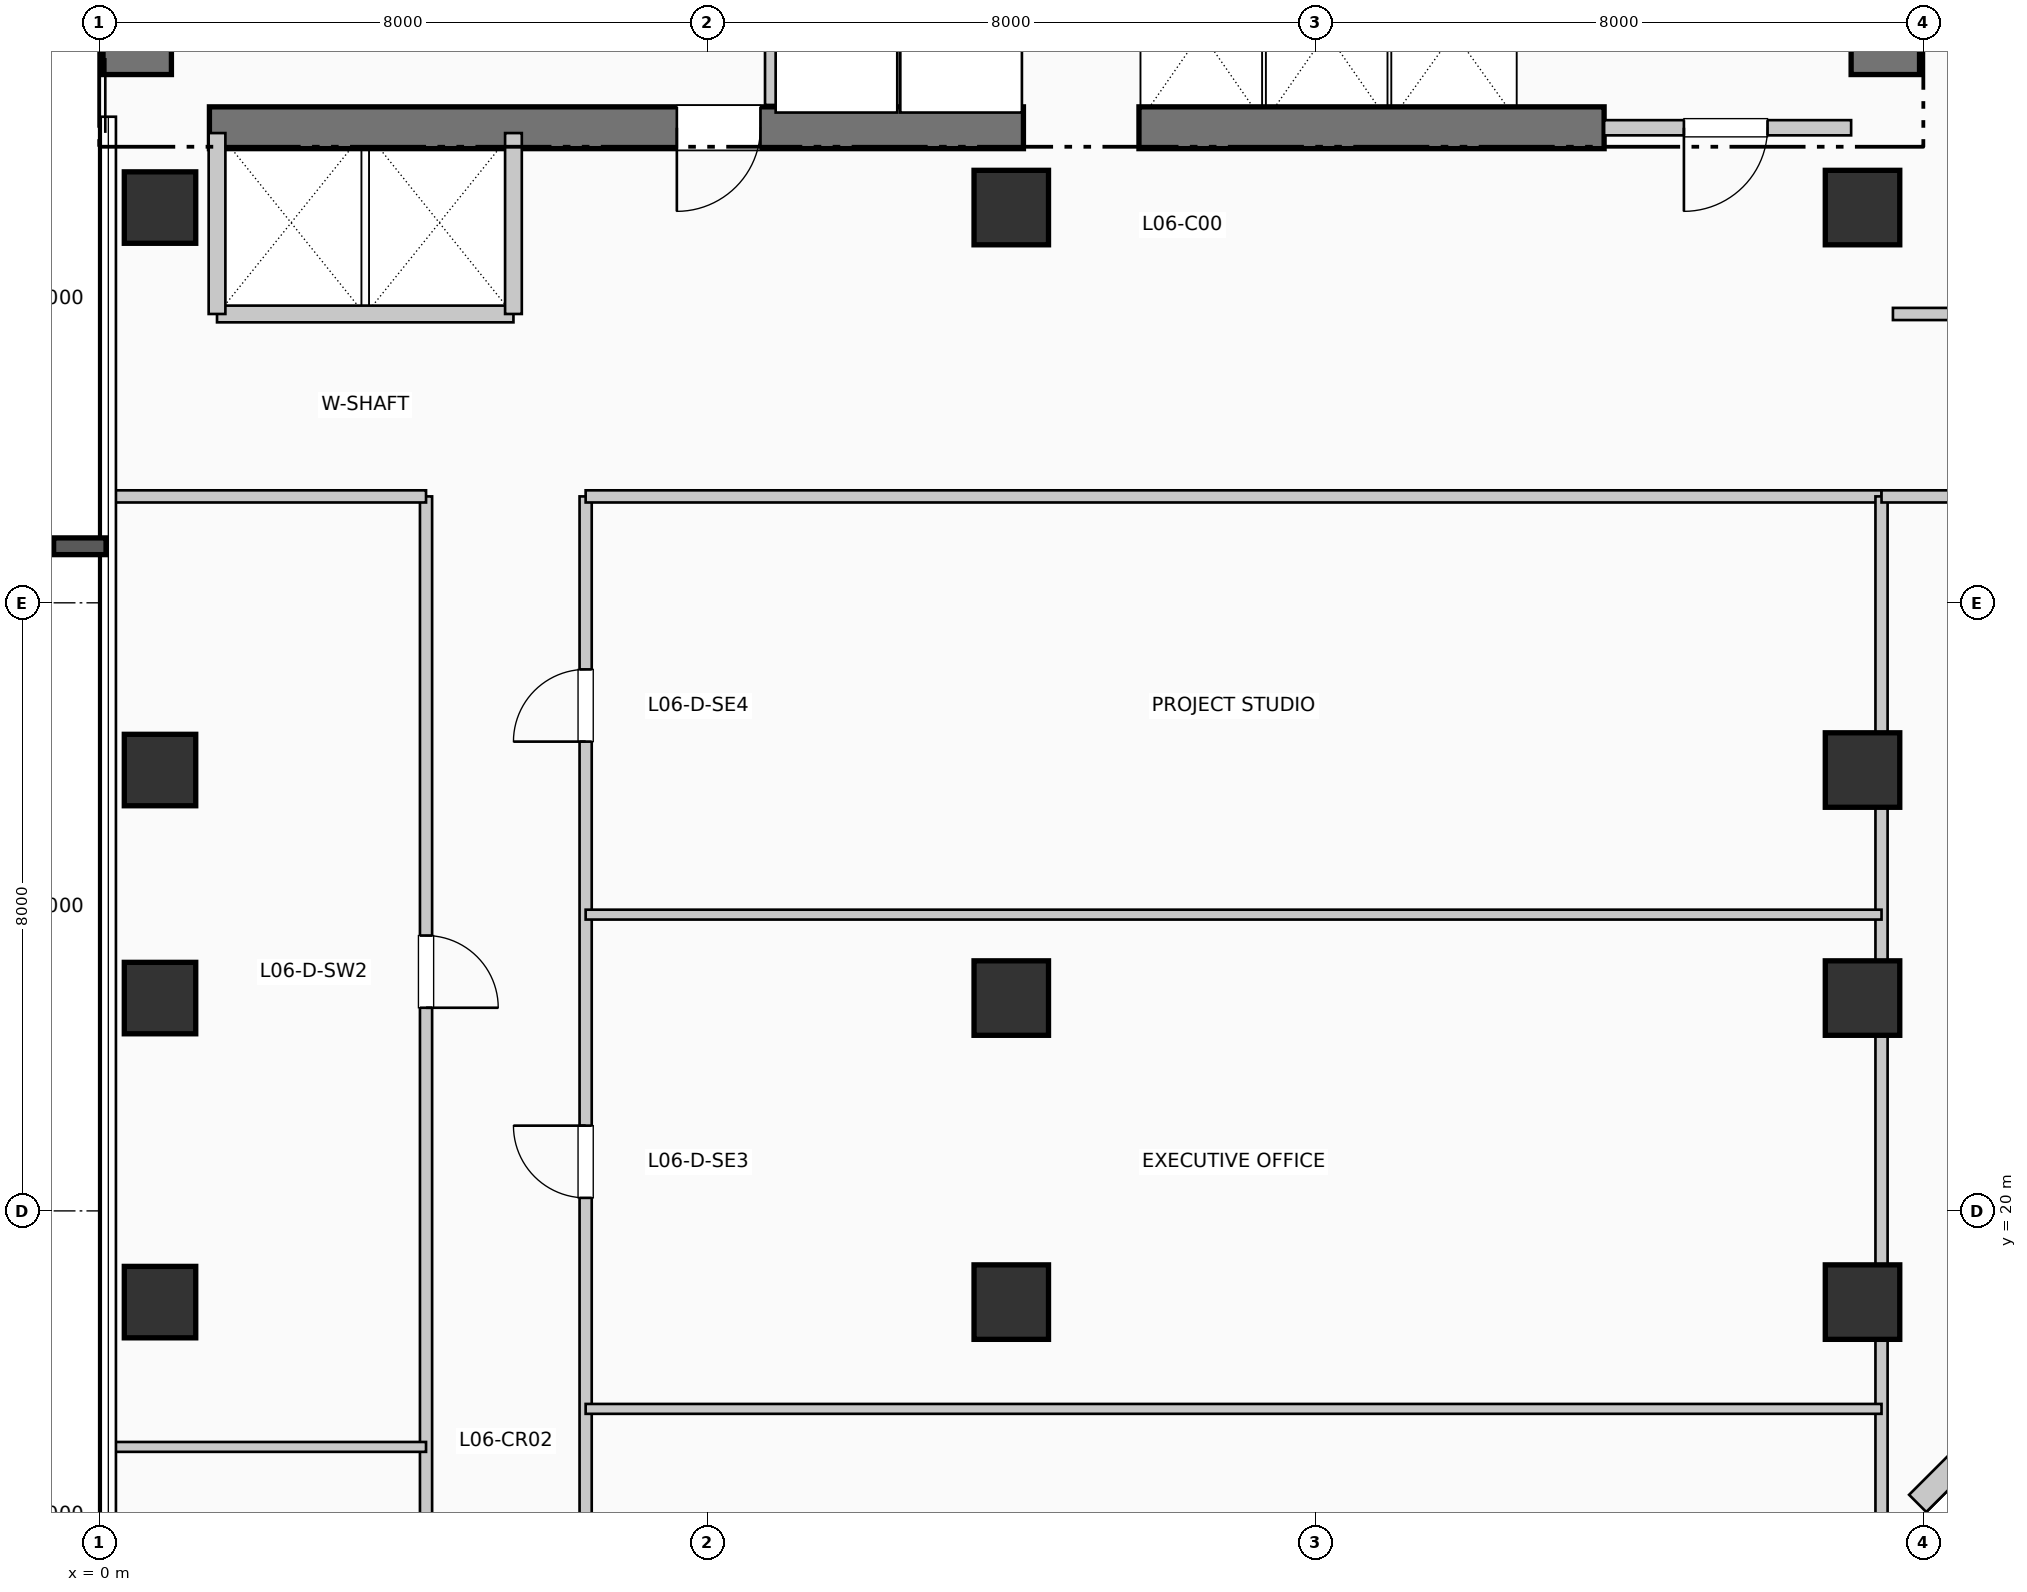
"""IFC4 building model, lengths in metres.
Left out: names, types, materials, properties, quantities, classifications, styles, units other than length and angle.
Written with IfcOpenShell. Run it as: python <this file> out.ifc"""

import sys

from ifc_helpers import new_model, si_unit, direction, frame, frame_2d, origin, origin_2d, place, context, subcontext, project, spatial, rectangle, extrude, element, fill, save


model = new_model("IFC4")
c1 = context("Model", 3, precision=1e-05, world=origin(), true_north=direction((0.0, 1.0)))
c2 = subcontext(c1, "Body", "Model", "MODEL_VIEW")
j1 = project(units=[si_unit("LENGTHUNIT", "METRE"), si_unit("PLANEANGLEUNIT", "RADIAN")], contexts=[c1])
p1 = place(None, origin())
s1 = spatial("IfcSite", under=j1, at=p1, CompositionType="ELEMENT")
p2 = place(p1, origin())
s2 = spatial("IfcBuilding", under=s1, at=p2, CompositionType="ELEMENT")
p3 = place(p2, frame((0.0, 0.0, 30.36)))
s3 = spatial("IfcBuildingStorey", under=s2, at=p3, CompositionType="ELEMENT", Elevation=30.36)
p4 = place(p3, frame((0.5, 34.95, 0.0), z_axis=(0.0, 0.0, 1.0), x_axis=(0.0, 1.0, 0.0)))
e1 = element("IfcWall", 1, at=p4, inside=s3, PredefinedType="SHEAR", context=c2, shape_type="SweptSolid", body=[
    extrude(rectangle(XDim=7.9, YDim=0.9, at=frame_2d((3.95, 0.0))), origin(), (0.0, 0.0, 1.0), 3.96),
])
p5 = place(p3, frame((23.5, 34.95, 0.0), z_axis=(0.0, 0.0, 1.0), x_axis=(0.0, 1.0, 0.0)))
e2 = element("IfcWall", 2, at=p5, inside=s3, PredefinedType="SHEAR", context=c2, shape_type="SweptSolid", body=[
    extrude(rectangle(XDim=10.64, YDim=0.9, at=frame_2d((5.32, 0.0))), origin(), (0.0, 0.0, 1.0), 3.96),
])
p6 = place(p3, frame((1.45, 34.25, 0.0), z_axis=(0.0, 0.0, 1.0), x_axis=(1.0, 0.0, 0.0)))
e3 = element("IfcWall", 3, at=p6, inside=s3, PredefinedType="SHEAR", context=c2, shape_type="SweptSolid", body=[
    extrude(rectangle(XDim=10.71, YDim=0.55, at=frame_2d((5.355, 0.0))), origin(), (0.0, 0.0, 1.0), 3.96),
])
p7 = place(p6, frame((7.25, 0.0, 0.0), z_axis=(0.0, 0.0, 1.0), x_axis=(-1.0, 0.0, 0.0)))
e4 = element("IfcOpeningElement", 4, at=p7, cuts=e3, PredefinedType="OPENING", context=c2, shape_type="SweptSolid", body=[
    extrude(rectangle(XDim=1.1, YDim=2.15, at=frame_2d((0.55, 1.075))), frame((0.0, 0.285, 0.0), z_axis=(0.0, -1.0, 0.0), x_axis=(1.0, 0.0, 0.0)), (0.0, 0.0, 1.0), 0.57),
])
p8 = place(p3, frame((13.68, 34.25, 0.0), z_axis=(0.0, 0.0, 1.0), x_axis=(1.0, 0.0, 0.0)))
e5 = element("IfcWall", 5, at=p8, inside=s3, PredefinedType="SHEAR", context=c2, shape_type="SweptSolid", body=[
    extrude(rectangle(XDim=6.12, YDim=0.55, at=frame_2d((3.06, 0.0))), origin(), (0.0, 0.0, 1.0), 3.96),
])
for number, where, z_axis, x_axis in (
    (6, (0.8, 18.8, 0.0), (0.0, 0.0, 1.0), (1.0, 0.0, 0.0)),
    (7, (0.8, 22.8, 0.0), (0.0, 0.0, 1.0), (1.0, 0.0, 0.0)),
    (8, (0.8, 25.8, 0.0), (0.0, 0.0, 1.0), (1.0, 0.0, 0.0)),
    (9, (0.8, 33.2, 0.0), (0.0, 0.0, 1.0), (1.0, 0.0, 0.0)),
):
    element("IfcColumn", number, at=place(p3, frame(where, z_axis=z_axis, x_axis=x_axis)), inside=s3, PredefinedType="COLUMN", context=c2, shape_type="SweptSolid", body=[
        extrude(rectangle(XDim=0.94, YDim=0.94, at=origin_2d()), origin(), (0.0, 0.0, 1.0), 3.96),
    ])
for number, where, z_axis, x_axis in (
    (10, (12.0, 18.8, 0.0), (0.0, 0.0, 1.0), (1.0, 0.0, 0.0)),
    (11, (12.0, 22.8, 0.0), (0.0, 0.0, 1.0), (1.0, 0.0, 0.0)),
    (12, (12.0, 33.2, 0.0), (0.0, 0.0, 1.0), (1.0, 0.0, 0.0)),
    (13, (23.2, 18.8, 0.0), (0.0, 0.0, 1.0), (1.0, 0.0, 0.0)),
    (14, (23.2, 22.8, 0.0), (0.0, 0.0, 1.0), (1.0, 0.0, 0.0)),
    (15, (23.2, 25.8, 0.0), (0.0, 0.0, 1.0), (1.0, 0.0, 0.0)),
    (16, (23.2, 33.2, 0.0), (0.0, 0.0, 1.0), (1.0, 0.0, 0.0)),
):
    element("IfcColumn", number, at=place(p3, frame(where, z_axis=z_axis, x_axis=x_axis)), inside=s3, PredefinedType="COLUMN", context=c2, shape_type="SweptSolid", body=[
        extrude(rectangle(XDim=0.98, YDim=0.98, at=origin_2d()), origin(), (0.0, 0.0, 1.0), 3.96),
    ])
p9 = place(p3, frame((23.926, 16.152, 0.0), z_axis=(0.0, 0.0, 1.0), x_axis=(0.707106781187, 0.707106781187, 0.0)))
e17 = element("IfcWall", 17, at=p9, inside=s3, PredefinedType="SOLIDWALL", context=c2, shape_type="SweptSolid", body=[
    extrude(rectangle(XDim=2.718, YDim=0.32, at=frame_2d((1.359, 0.0))), origin(), (0.0, 0.0, 1.0), 3.71),
])
p10 = place(p3, frame((8.86, 34.55, 0.0), z_axis=(0.0, 0.0, 1.0), x_axis=(0.0, 1.0, 0.0)))
e18 = element("IfcWall", 18, at=p10, inside=s3, PredefinedType="PARTITIONING", context=c2, shape_type="SweptSolid", body=[
    extrude(rectangle(XDim=2.5, YDim=0.2, at=frame_2d((1.25, 0.0))), origin(), (0.0, 0.0, 1.0), 3.71),
])
p11 = place(p3, frame((19.8, 34.25, 0.0), z_axis=(0.0, 0.0, 1.0), x_axis=(1.0, 0.0, 0.0)))
e19 = element("IfcWall", 19, at=p11, inside=s3, PredefinedType="PARTITIONING", context=c2, shape_type="SweptSolid", body=[
    extrude(rectangle(XDim=3.25, YDim=0.2, at=frame_2d((1.625, 0.0))), origin(), (0.0, 0.0, 1.0), 3.71),
])
p12 = place(p11, frame((2.15, 0.0, 0.0), z_axis=(0.0, 0.0, 1.0), x_axis=(-1.0, 0.0, 0.0)))
e20 = element("IfcOpeningElement", 20, at=p12, cuts=e19, PredefinedType="OPENING", context=c2, shape_type="SweptSolid", body=[
    extrude(rectangle(XDim=1.1, YDim=2.15, at=frame_2d((0.55, 1.075))), frame((0.0, 0.11, 0.0), z_axis=(0.0, -1.0, 0.0), x_axis=(1.0, 0.0, 0.0)), (0.0, 0.0, 1.0), 0.22),
])
p13 = place(p3, frame((1.55, 31.8, 0.0), z_axis=(0.0, 0.0, 1.0), x_axis=(1.0, 0.0, 0.0)))
e21 = element("IfcWall", 21, at=p13, inside=s3, PredefinedType="PARTITIONING", context=c2, shape_type="SweptSolid", body=[
    extrude(rectangle(XDim=3.9, YDim=0.22, at=frame_2d((1.95, 0.0))), origin(), (0.0, 0.0, 1.0), 3.71),
])
for number, where, z_axis, x_axis in (
    (22, (1.55, 31.8, 0.0), (0.0, 0.0, 1.0), (0.0, 1.0, 0.0)),
    (23, (5.45, 31.8, 0.0), (0.0, 0.0, 1.0), (0.0, 1.0, 0.0)),
):
    element("IfcWall", number, at=place(p3, frame(where, z_axis=z_axis, x_axis=x_axis)), inside=s3, PredefinedType="PARTITIONING", context=c2, shape_type="SweptSolid", body=[
        extrude(rectangle(XDim=2.38, YDim=0.22, at=frame_2d((1.19, 0.0))), origin(), (0.0, 0.0, 1.0), 3.71),
    ])
p14 = place(p3, frame((4.3, 4.39, 0.0), z_axis=(0.0, 0.0, 1.0), x_axis=(0.0, 1.0, 0.0)))
e24 = element("IfcWall", 24, at=p14, inside=s3, PredefinedType="PARTITIONING", context=c2, shape_type="SweptSolid", body=[
    extrude(rectangle(XDim=25.01, YDim=0.16, at=frame_2d((12.505, 0.0))), origin(), (0.0, 0.0, 1.0), 3.71),
])
p15 = place(p14, frame((6.728, 0.0, 0.0), z_axis=(0.0, 0.0, 1.0), x_axis=(-1.0, 0.0, 0.0)))
e25 = element("IfcOpeningElement", 25, at=p15, cuts=e24, PredefinedType="OPENING", context=c2, shape_type="SweptSolid", body=[
    extrude(rectangle(XDim=0.95, YDim=2.15, at=frame_2d((0.475, 1.075))), frame((0.0, 0.09, 0.0), z_axis=(0.0, -1.0, 0.0), x_axis=(1.0, 0.0, 0.0)), (0.0, 0.0, 1.0), 0.18),
])
p16 = place(p14, frame((19.232, 0.0, 0.0), z_axis=(0.0, 0.0, 1.0), x_axis=(-1.0, 0.0, 0.0)))
e26 = element("IfcOpeningElement", 26, at=p16, cuts=e24, PredefinedType="OPENING", context=c2, shape_type="SweptSolid", body=[
    extrude(rectangle(XDim=0.95, YDim=2.15, at=frame_2d((0.475, 1.075))), frame((0.0, 0.09, 0.0), z_axis=(0.0, -1.0, 0.0), x_axis=(1.0, 0.0, 0.0)), (0.0, 0.0, 1.0), 0.18),
])
p17 = place(p3, frame((6.4, 4.39, 0.0), z_axis=(0.0, 0.0, 1.0), x_axis=(0.0, 1.0, 0.0)))
e27 = element("IfcWall", 27, at=p17, inside=s3, PredefinedType="PARTITIONING", context=c2, shape_type="SweptSolid", body=[
    extrude(rectangle(XDim=25.01, YDim=0.16, at=frame_2d((12.505, 0.0))), origin(), (0.0, 0.0, 1.0), 3.71),
])
p18 = place(p17, frame((2.526, 0.0, 0.0)))
e28 = element("IfcOpeningElement", 28, at=p18, cuts=e27, PredefinedType="OPENING", context=c2, shape_type="SweptSolid", body=[
    extrude(rectangle(XDim=0.95, YDim=2.15, at=frame_2d((0.475, 1.075))), frame((0.0, 0.09, 0.0), z_axis=(0.0, -1.0, 0.0), x_axis=(1.0, 0.0, 0.0)), (0.0, 0.0, 1.0), 0.18),
])
p19 = place(p17, frame((9.029, 0.0, 0.0)))
e29 = element("IfcOpeningElement", 29, at=p19, cuts=e27, PredefinedType="OPENING", context=c2, shape_type="SweptSolid", body=[
    extrude(rectangle(XDim=0.95, YDim=2.15, at=frame_2d((0.475, 1.075))), frame((0.0, 0.09, 0.0), z_axis=(0.0, -1.0, 0.0), x_axis=(1.0, 0.0, 0.0)), (0.0, 0.0, 1.0), 0.18),
])
p20 = place(p17, frame((15.781, 0.0, 0.0)))
e30 = element("IfcOpeningElement", 30, at=p20, cuts=e27, PredefinedType="OPENING", context=c2, shape_type="SweptSolid", body=[
    extrude(rectangle(XDim=0.95, YDim=2.15, at=frame_2d((0.475, 1.075))), frame((0.0, 0.09, 0.0), z_axis=(0.0, -1.0, 0.0), x_axis=(1.0, 0.0, 0.0)), (0.0, 0.0, 1.0), 0.18),
])
p21 = place(p17, frame((21.784, 0.0, 0.0)))
e31 = element("IfcOpeningElement", 31, at=p21, cuts=e27, PredefinedType="OPENING", context=c2, shape_type="SweptSolid", body=[
    extrude(rectangle(XDim=0.95, YDim=2.15, at=frame_2d((0.475, 1.075))), frame((0.0, 0.09, 0.0), z_axis=(0.0, -1.0, 0.0), x_axis=(1.0, 0.0, 0.0)), (0.0, 0.0, 1.0), 0.18),
])
p22 = place(p3, frame((0.19, 29.4, 0.0), z_axis=(0.0, 0.0, 1.0), x_axis=(1.0, 0.0, 0.0)))
e32 = element("IfcWall", 32, at=p22, inside=s3, PredefinedType="PARTITIONING", context=c2, shape_type="SweptSolid", body=[
    extrude(rectangle(XDim=4.11, YDim=0.16, at=frame_2d((2.055, 0.0))), origin(), (0.0, 0.0, 1.0), 3.365),
])
p23 = place(p3, frame((6.4, 29.4, 0.0), z_axis=(0.0, 0.0, 1.0), x_axis=(1.0, 0.0, 0.0)))
e33 = element("IfcWall", 33, at=p23, inside=s3, PredefinedType="PARTITIONING", context=c2, shape_type="SweptSolid", body=[
    extrude(rectangle(XDim=17.05, YDim=0.16, at=frame_2d((8.525, 0.0))), origin(), (0.0, 0.0, 1.0), 3.365),
])
p24 = place(p3, frame((23.45, 0.19, 0.0), z_axis=(0.0, 0.0, 1.0), x_axis=(0.0, 1.0, 0.0)))
e34 = element("IfcWall", 34, at=p24, inside=s3, PredefinedType="PARTITIONING", context=c2, shape_type="SweptSolid", body=[
    extrude(rectangle(XDim=29.21, YDim=0.16, at=frame_2d((14.605, 0.0))), origin(), (0.0, 0.0, 1.0), 2.995),
])
p25 = place(p3, frame((0.19, 16.895, 0.0), z_axis=(0.0, 0.0, 1.0), x_axis=(1.0, 0.0, 0.0)))
e35 = element("IfcWall", 35, at=p25, inside=s3, PredefinedType="PARTITIONING", context=c2, shape_type="SweptSolid", body=[
    extrude(rectangle(XDim=4.11, YDim=0.13, at=frame_2d((2.055, 0.0))), origin(), (0.0, 0.0, 1.0), 3.71),
])
for number, where, z_axis, x_axis in (
    (36, (6.4, 17.395, 0.0), (0.0, 0.0, 1.0), (1.0, 0.0, 0.0)),
    (37, (6.4, 23.898, 0.0), (0.0, 0.0, 1.0), (1.0, 0.0, 0.0)),
):
    element("IfcWall", number, at=place(p3, frame(where, z_axis=z_axis, x_axis=x_axis)), inside=s3, PredefinedType="PARTITIONING", context=c2, shape_type="SweptSolid", body=[
        extrude(rectangle(XDim=17.05, YDim=0.13, at=frame_2d((8.525, 0.0))), origin(), (0.0, 0.0, 1.0), 3.71),
    ])
p26 = place(p3, frame((23.45, 29.4, 0.0), z_axis=(0.0, 0.0, 1.0), x_axis=(1.0, 0.0, 0.0)))
e38 = element("IfcWall", 38, at=p26, inside=s3, PredefinedType="PARTITIONING", context=c2, shape_type="SweptSolid", body=[
    extrude(rectangle(XDim=32.36, YDim=0.16, at=frame_2d((16.18, 0.0))), origin(), (0.0, 0.0, 1.0), 3.365),
])
p27 = place(p26, frame((5.976, 0.0, 0.0), z_axis=(0.0, 0.0, 1.0), x_axis=(-1.0, 0.0, 0.0)))
e39 = element("IfcOpeningElement", 39, at=p27, cuts=e38, PredefinedType="OPENING", context=c2, shape_type="SweptSolid", body=[
    extrude(rectangle(XDim=0.95, YDim=2.15, at=frame_2d((0.475, 1.075))), frame((0.0, 0.09, 0.0), z_axis=(0.0, -1.0, 0.0), x_axis=(1.0, 0.0, 0.0)), (0.0, 0.0, 1.0), 0.18),
])
p28 = place(p26, frame((16.979, 0.0, 0.0), z_axis=(0.0, 0.0, 1.0), x_axis=(-1.0, 0.0, 0.0)))
e40 = element("IfcOpeningElement", 40, at=p28, cuts=e38, PredefinedType="OPENING", context=c2, shape_type="SweptSolid", body=[
    extrude(rectangle(XDim=0.95, YDim=2.15, at=frame_2d((0.475, 1.075))), frame((0.0, 0.09, 0.0), z_axis=(0.0, -1.0, 0.0), x_axis=(1.0, 0.0, 0.0)), (0.0, 0.0, 1.0), 0.18),
])
p29 = place(p26, frame((27.657, 0.0, 0.0), z_axis=(0.0, 0.0, 1.0), x_axis=(-1.0, 0.0, 0.0)))
e41 = element("IfcOpeningElement", 41, at=p29, cuts=e38, PredefinedType="OPENING", context=c2, shape_type="SweptSolid", body=[
    extrude(rectangle(XDim=0.95, YDim=2.15, at=frame_2d((0.475, 1.075))), frame((0.0, 0.09, 0.0), z_axis=(0.0, -1.0, 0.0), x_axis=(1.0, 0.0, 0.0)), (0.0, 0.0, 1.0), 0.18),
])
p30 = place(p3, frame((23.6, 31.8, 0.0), z_axis=(0.0, 0.0, 1.0), x_axis=(1.0, 0.0, 0.0)))
e42 = element("IfcWall", 42, at=p30, inside=s3, PredefinedType="PARTITIONING", context=c2, shape_type="SweptSolid", body=[
    extrude(rectangle(XDim=32.21, YDim=0.16, at=frame_2d((16.105, 0.0))), origin(), (0.0, 0.0, 1.0), 3.71),
])
p31 = place(p30, frame((8.577, 0.0, 0.0)))
e43 = element("IfcOpeningElement", 43, at=p31, cuts=e42, PredefinedType="OPENING", context=c2, shape_type="SweptSolid", body=[
    extrude(rectangle(XDim=0.95, YDim=2.15, at=frame_2d((0.475, 1.075))), frame((0.0, 0.09, 0.0), z_axis=(0.0, -1.0, 0.0), x_axis=(1.0, 0.0, 0.0)), (0.0, 0.0, 1.0), 0.18),
])
p32 = place(p30, frame((23.683, 0.0, 0.0)))
e44 = element("IfcOpeningElement", 44, at=p32, cuts=e42, PredefinedType="OPENING", context=c2, shape_type="SweptSolid", body=[
    extrude(rectangle(XDim=0.95, YDim=2.15, at=frame_2d((0.475, 1.075))), frame((0.0, 0.09, 0.0), z_axis=(0.0, -1.0, 0.0), x_axis=(1.0, 0.0, 0.0)), (0.0, 0.0, 1.0), 0.18),
])
p33 = place(p7, origin())
e45 = element("IfcDoor", 45, at=p33, inside=s3, OperationType="SINGLE_SWING_LEFT", PredefinedType="DOOR", context=c2, shape_type="SweptSolid", body=[
    extrude(rectangle(XDim=1.1, YDim=2.15, at=frame_2d((0.55, 1.075))), frame((0.0, 0.025, 0.0), z_axis=(0.0, -1.0, 0.0), x_axis=(1.0, 0.0, 0.0)), (0.0, 0.0, 1.0), 0.05),
])
fill(e4, e45)
p34 = place(p12, origin())
e46 = element("IfcDoor", 46, at=p34, inside=s3, OperationType="SINGLE_SWING_LEFT", PredefinedType="DOOR", context=c2, shape_type="SweptSolid", body=[
    extrude(rectangle(XDim=1.1, YDim=2.15, at=frame_2d((0.55, 1.075))), frame((0.0, 0.025, 0.0), z_axis=(0.0, -1.0, 0.0), x_axis=(1.0, 0.0, 0.0)), (0.0, 0.0, 1.0), 0.05),
])
fill(e20, e46)
p35 = place(p16, origin())
e47 = element("IfcDoor", 47, at=p35, inside=s3, OperationType="SINGLE_SWING_LEFT", PredefinedType="DOOR", context=c2, shape_type="SweptSolid", body=[
    extrude(rectangle(XDim=0.95, YDim=2.15, at=frame_2d((0.475, 1.075))), frame((0.0, 0.025, 0.0), z_axis=(0.0, -1.0, 0.0), x_axis=(1.0, 0.0, 0.0)), (0.0, 0.0, 1.0), 0.05),
])
fill(e26, e47)
p36 = place(p20, origin())
e48 = element("IfcDoor", 48, at=p36, inside=s3, OperationType="SINGLE_SWING_RIGHT", PredefinedType="DOOR", context=c2, shape_type="SweptSolid", body=[
    extrude(rectangle(XDim=0.95, YDim=2.15, at=frame_2d((0.475, 1.075))), frame((0.0, 0.025, 0.0), z_axis=(0.0, -1.0, 0.0), x_axis=(1.0, 0.0, 0.0)), (0.0, 0.0, 1.0), 0.05),
])
fill(e30, e48)
p37 = place(p21, origin())
e49 = element("IfcDoor", 49, at=p37, inside=s3, OperationType="SINGLE_SWING_LEFT", PredefinedType="DOOR", context=c2, shape_type="SweptSolid", body=[
    extrude(rectangle(XDim=0.95, YDim=2.15, at=frame_2d((0.475, 1.075))), frame((0.0, 0.025, 0.0), z_axis=(0.0, -1.0, 0.0), x_axis=(1.0, 0.0, 0.0)), (0.0, 0.0, 1.0), 0.05),
])
fill(e31, e49)
save(model, sys.argv[1])
